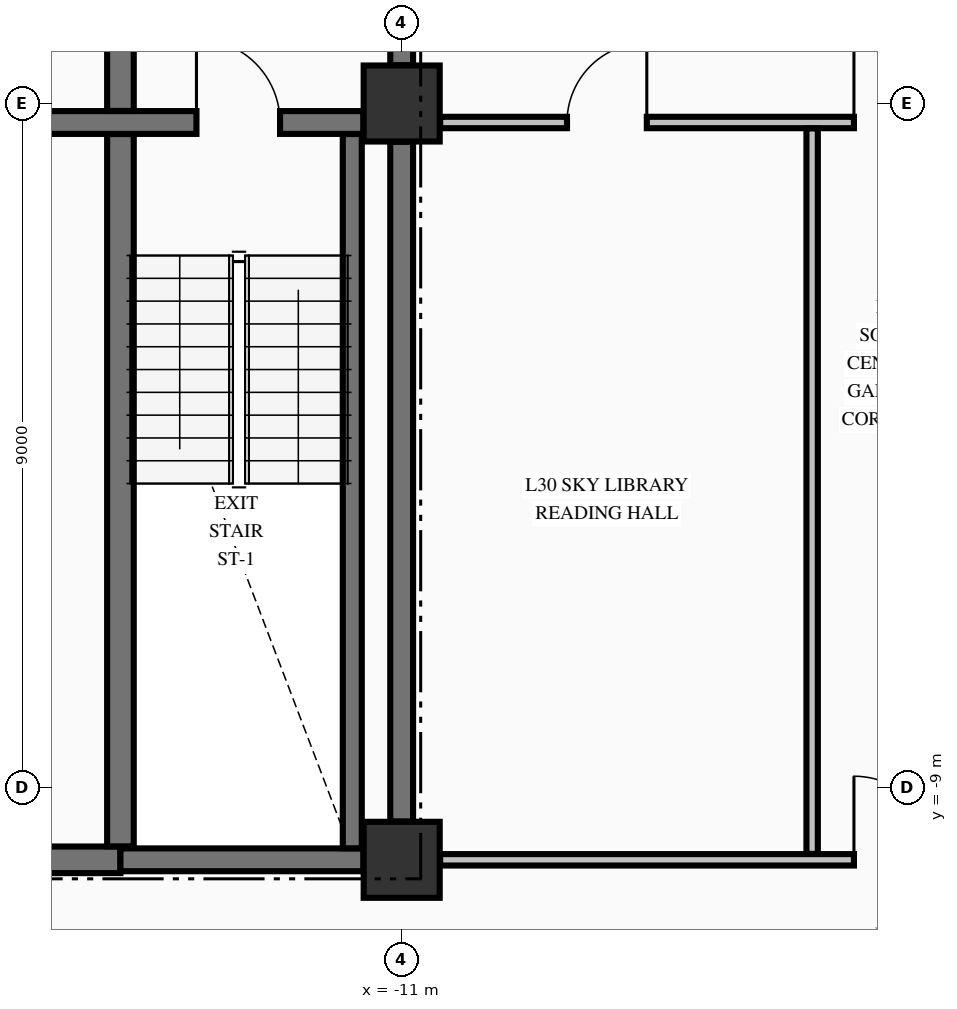
"""IFC4 building model, lengths in metres.
Left out: names, types, materials, properties, quantities, classifications, styles, units other than length and angle.
Written with IfcOpenShell. Run it as: python <this file> out.ifc"""

import sys

from ifc_helpers import new_model, si_unit, direction, frame, frame_2d, origin, origin_2d, place, context, subcontext, project, spatial, rectangle, extrude, element, fill, save


model = new_model("IFC4")
c1 = context("Model", 3, precision=1e-05, world=origin(), true_north=direction((0.0, 1.0)))
c2 = subcontext(c1, "Body", "Model", "MODEL_VIEW")
j1 = project(units=[si_unit("LENGTHUNIT", "METRE"), si_unit("PLANEANGLEUNIT", "RADIAN")], contexts=[c1])
p1 = place(None, origin())
s1 = spatial("IfcSite", under=j1, at=p1, CompositionType="ELEMENT")
p2 = place(p1, origin())
s2 = spatial("IfcBuilding", under=s1, at=p2, CompositionType="ELEMENT")
p3 = place(p2, frame((0.0, 0.0, 121.35)))
s3 = spatial("IfcBuildingStorey", under=s2, at=p3, CompositionType="ELEMENT", Elevation=121.35)
for number, where, z_axis, x_axis in (
    (1, (-11.0, -9.95, -0.425), (0.0, 0.0, 1.0), (1.0, 0.0, 0.0)),
    (2, (-11.0, 0.0, -0.425), (0.0, 0.0, 1.0), (1.0, 0.0, 0.0)),
):
    element("IfcColumn", number, at=place(p3, frame(where, z_axis=z_axis, x_axis=x_axis)), inside=s3, PredefinedType="COLUMN", context=c2, shape_type="SweptSolid", body=[
        extrude(rectangle(XDim=1.0, YDim=1.0, at=origin_2d()), origin(), (0.0, 0.0, 1.0), 3.745),
    ])
p4 = place(p3, frame((-19.496, -9.95, 0.0), z_axis=(0.0, 0.0, 1.0), x_axis=(1.0, 0.0, 0.0)))
e3 = element("IfcWall", 3, at=p4, inside=s3, PredefinedType="SHEAR", context=c2, shape_type="SweptSolid", body=[
    extrude(rectangle(XDim=4.796, YDim=0.35, at=frame_2d((2.398, 0.0))), origin(), (0.0, 0.0, 1.0), 3.32),
])
p5 = place(p4, frame((0.671, 0.0, 0.0)))
e4 = element("IfcOpeningElement", 4, at=p5, cuts=e3, PredefinedType="OPENING", context=c2, shape_type="SweptSolid", body=[
    extrude(rectangle(XDim=1.05, YDim=2.15, at=frame_2d((0.525, 1.075))), frame((0.0, 0.185, 0.0), z_axis=(0.0, -1.0, 0.0), x_axis=(1.0, 0.0, 0.0)), (0.0, 0.0, 1.0), 0.37),
])
p6 = place(p3, frame((-14.7, -9.95, 0.0), z_axis=(0.0, 0.0, 1.0), x_axis=(1.0, 0.0, 0.0)))
e5 = element("IfcWall", 5, at=p6, inside=s3, PredefinedType="SHEAR", context=c2, shape_type="SweptSolid", body=[
    extrude(rectangle(XDim=3.196, YDim=0.3, at=frame_2d((1.598, 0.0))), origin(), (0.0, 0.0, 1.0), 3.32),
])
p7 = place(p3, frame((-19.496, -0.25, 0.0), z_axis=(0.0, 0.0, 1.0), x_axis=(1.0, 0.0, 0.0)))
e6 = element("IfcWall", 6, at=p7, inside=s3, PredefinedType="SHEAR", context=c2, shape_type="SweptSolid", body=[
    extrude(rectangle(XDim=7.992, YDim=0.3, at=frame_2d((3.996, 0.0))), origin(), (0.0, 0.0, 1.0), 3.32),
])
p8 = place(p7, frame((5.796, 0.0, 0.0)))
e7 = element("IfcOpeningElement", 7, at=p8, cuts=e6, PredefinedType="OPENING", context=c2, shape_type="SweptSolid", body=[
    extrude(rectangle(XDim=1.1, YDim=2.15, at=frame_2d((0.55, 1.075))), frame((0.0, 0.16, 0.0), z_axis=(0.0, -1.0, 0.0), x_axis=(1.0, 0.0, 0.0)), (0.0, 0.0, 1.0), 0.32),
])
p9 = place(p3, frame((-10.494, -9.95, 0.0), z_axis=(0.0, 0.0, 1.0), x_axis=(1.0, 0.0, 0.0)))
e8 = element("IfcWall", 8, at=p9, inside=s3, PredefinedType="PARTITIONING", context=c2, shape_type="SweptSolid", body=[
    extrude(rectangle(XDim=20.988, YDim=0.15, at=frame_2d((10.494, 0.0))), origin(), (0.0, 0.0, 1.0), 3.32),
])
p10 = place(p9, frame((5.444, 0.0, 0.0)))
e9 = element("IfcOpeningElement", 9, at=p10, cuts=e8, PredefinedType="OPENING", context=c2, shape_type="SweptSolid", body=[
    extrude(rectangle(XDim=1.1, YDim=2.15, at=frame_2d((0.55, 1.075))), frame((0.0, 0.085, 0.0), z_axis=(0.0, -1.0, 0.0), x_axis=(1.0, 0.0, 0.0)), (0.0, 0.0, 1.0), 0.17),
])
p11 = place(p9, frame((13.619, 0.0, 0.0)))
e10 = element("IfcOpeningElement", 10, at=p11, cuts=e8, PredefinedType="OPENING", context=c2, shape_type="SweptSolid", body=[
    extrude(rectangle(XDim=0.95, YDim=2.15, at=frame_2d((0.475, 1.075))), frame((0.0, 0.085, 0.0), z_axis=(0.0, -1.0, 0.0), x_axis=(1.0, 0.0, 0.0)), (0.0, 0.0, 1.0), 0.17),
])
p12 = place(p9, frame((17.844, 0.0, 0.0)))
e11 = element("IfcOpeningElement", 11, at=p12, cuts=e8, PredefinedType="OPENING", context=c2, shape_type="SweptSolid", body=[
    extrude(rectangle(XDim=0.9, YDim=2.15, at=frame_2d((0.45, 1.075))), frame((0.0, 0.085, 0.0), z_axis=(0.0, -1.0, 0.0), x_axis=(1.0, 0.0, 0.0)), (0.0, 0.0, 1.0), 0.17),
])
p13 = place(p3, frame((-10.494, -0.25, 0.0), z_axis=(0.0, 0.0, 1.0), x_axis=(1.0, 0.0, 0.0)))
e12 = element("IfcWall", 12, at=p13, inside=s3, PredefinedType="PARTITIONING", context=c2, shape_type="SweptSolid", body=[
    extrude(rectangle(XDim=20.988, YDim=0.15, at=frame_2d((10.494, 0.0))), origin(), (0.0, 0.0, 1.0), 3.32),
])
p14 = place(p13, frame((5.444, 0.0, 0.0)))
e13 = element("IfcOpeningElement", 13, at=p14, cuts=e12, PredefinedType="OPENING", context=c2, shape_type="SweptSolid", body=[
    extrude(rectangle(XDim=1.1, YDim=2.15, at=frame_2d((0.55, 1.075))), frame((0.0, 0.085, 0.0), z_axis=(0.0, -1.0, 0.0), x_axis=(1.0, 0.0, 0.0)), (0.0, 0.0, 1.0), 0.17),
])
p15 = place(p13, frame((1.669, 0.0, 0.0)))
e14 = element("IfcOpeningElement", 14, at=p15, cuts=e12, PredefinedType="OPENING", context=c2, shape_type="SweptSolid", body=[
    extrude(rectangle(XDim=1.05, YDim=2.15, at=frame_2d((0.525, 1.075))), frame((0.0, 0.085, 0.0), z_axis=(0.0, -1.0, 0.0), x_axis=(1.0, 0.0, 0.0)), (0.0, 0.0, 1.0), 0.17),
])
p16 = place(p13, frame((13.819, 0.0, 0.0)))
e15 = element("IfcOpeningElement", 15, at=p16, cuts=e12, PredefinedType="OPENING", context=c2, shape_type="SweptSolid", body=[
    extrude(rectangle(XDim=0.95, YDim=2.15, at=frame_2d((0.475, 1.075))), frame((0.0, 0.085, 0.0), z_axis=(0.0, -1.0, 0.0), x_axis=(1.0, 0.0, 0.0)), (0.0, 0.0, 1.0), 0.17),
])
p17 = place(p3, frame((-14.7, -9.773, 0.0), z_axis=(0.0, 0.0, 1.0), x_axis=(0.0, 1.0, 0.0)))
e16 = element("IfcWall", 16, at=p17, inside=s3, PredefinedType="SHEAR", context=c2, shape_type="SweptSolid", body=[
    extrude(rectangle(XDim=9.371, YDim=0.35, at=frame_2d((4.686, 0.0))), origin(), (0.0, 0.0, 1.0), 3.32),
])
p18 = place(p3, frame((-14.7, -0.098, 0.0), z_axis=(0.0, 0.0, 1.0), x_axis=(0.0, 1.0, 0.0)))
e17 = element("IfcWall", 17, at=p18, inside=s3, PredefinedType="SHEAR", context=c2, shape_type="SweptSolid", body=[
    extrude(rectangle(XDim=2.846, YDim=0.35, at=frame_2d((1.423, 0.0))), origin(), (0.0, 0.0, 1.0), 3.32),
])
p19 = place(p3, frame((-11.65, -9.798, 0.0), z_axis=(0.0, 0.0, 1.0), x_axis=(0.0, 1.0, 0.0)))
e18 = element("IfcWall", 18, at=p19, inside=s3, PredefinedType="SOLIDWALL", context=c2, shape_type="SweptSolid", body=[
    extrude(rectangle(XDim=9.396, YDim=0.25, at=frame_2d((4.698, 0.0))), origin(), (0.0, 0.0, 1.0), 3.32),
])
p20 = place(p3, frame((-11.0, -9.446, 0.0), z_axis=(0.0, 0.0, 1.0), x_axis=(0.0, 1.0, 0.0)))
e19 = element("IfcWall", 19, at=p20, inside=s3, PredefinedType="SHEAR", context=c2, shape_type="SweptSolid", body=[
    extrude(rectangle(XDim=8.942, YDim=0.3, at=frame_2d((4.471, 0.0))), origin(), (0.0, 0.0, 1.0), 3.32),
])
p21 = place(p3, frame((-11.0, 0.504, 0.0), z_axis=(0.0, 0.0, 1.0), x_axis=(0.0, 1.0, 0.0)))
e20 = element("IfcWall", 20, at=p21, inside=s3, PredefinedType="SHEAR", context=c2, shape_type="SweptSolid", body=[
    extrude(rectangle(XDim=2.244, YDim=0.3, at=frame_2d((1.122, 0.0))), origin(), (0.0, 0.0, 1.0), 3.32),
])
p22 = place(p21, frame((0.596, 0.0, 0.0)))
e21 = element("IfcOpeningElement", 21, at=p22, cuts=e20, PredefinedType="OPENING", context=c2, shape_type="SweptSolid", body=[
    extrude(rectangle(XDim=1.1, YDim=2.15, at=frame_2d((0.55, 1.075))), frame((0.0, 0.16, 0.0), z_axis=(0.0, -1.0, 0.0), x_axis=(1.0, 0.0, 0.0)), (0.0, 0.0, 1.0), 0.32),
])
p23 = place(p3, frame((-5.6, -9.872, 0.0), z_axis=(0.0, 0.0, 1.0), x_axis=(0.0, 1.0, 0.0)))
e22 = element("IfcWall", 22, at=p23, inside=s3, PredefinedType="PARTITIONING", context=c2, shape_type="SweptSolid", body=[
    extrude(rectangle(XDim=9.544, YDim=0.15, at=frame_2d((4.772, 0.0))), origin(), (0.0, 0.0, 1.0), 3.32),
])
p24 = place(p8, origin())
e23 = element("IfcDoor", 23, at=p24, inside=s3, OperationType="SINGLE_SWING_LEFT", PredefinedType="DOOR", context=c2, shape_type="SweptSolid", body=[
    extrude(rectangle(XDim=1.1, YDim=2.15, at=frame_2d((0.55, 1.075))), frame((0.0, 0.025, 0.0), z_axis=(0.0, -1.0, 0.0), x_axis=(1.0, 0.0, 0.0)), (0.0, 0.0, 1.0), 0.05),
])
fill(e7, e23)
p25 = place(p10, origin())
e24 = element("IfcDoor", 24, at=p25, inside=s3, OperationType="SINGLE_SWING_LEFT", PredefinedType="DOOR", context=c2, shape_type="SweptSolid", body=[
    extrude(rectangle(XDim=1.1, YDim=2.15, at=frame_2d((0.55, 1.075))), frame((0.0, 0.025, 0.0), z_axis=(0.0, -1.0, 0.0), x_axis=(1.0, 0.0, 0.0)), (0.0, 0.0, 1.0), 0.05),
])
fill(e9, e24)
p26 = place(p14, origin())
e25 = element("IfcDoor", 25, at=p26, inside=s3, OperationType="SINGLE_SWING_LEFT", PredefinedType="DOOR", context=c2, shape_type="SweptSolid", body=[
    extrude(rectangle(XDim=1.1, YDim=2.15, at=frame_2d((0.55, 1.075))), frame((0.0, 0.025, 0.0), z_axis=(0.0, -1.0, 0.0), x_axis=(1.0, 0.0, 0.0)), (0.0, 0.0, 1.0), 0.05),
])
fill(e13, e25)
p27 = place(p15, origin())
e26 = element("IfcDoor", 26, at=p27, inside=s3, OperationType="SINGLE_SWING_RIGHT", PredefinedType="DOOR", context=c2, shape_type="SweptSolid", body=[
    extrude(rectangle(XDim=1.05, YDim=2.15, at=frame_2d((0.525, 1.075))), frame((0.0, 0.025, 0.0), z_axis=(0.0, -1.0, 0.0), x_axis=(1.0, 0.0, 0.0)), (0.0, 0.0, 1.0), 0.05),
])
fill(e14, e26)
save(model, sys.argv[1])
